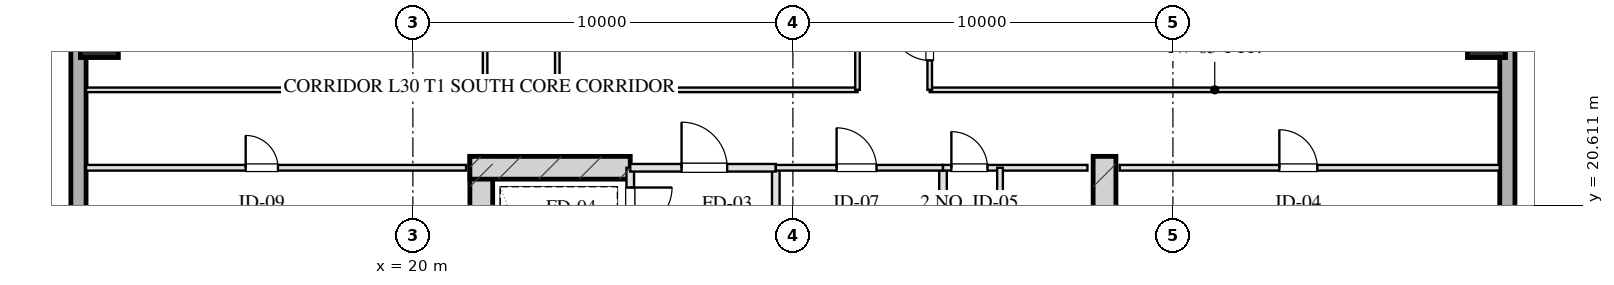
"""IFC4 building model, lengths in metres.
Left out: names, types, materials, properties, quantities, classifications, styles, units other than length and angle.
Written with IfcOpenShell. Run it as: python <this file> out.ifc"""

import sys

from ifc_helpers import new_model, si_unit, direction, frame, frame_2d, origin, origin_2d, place, context, subcontext, project, spatial, rectangle, hollow_rectangle, extrude, element, fill, save


model = new_model("IFC4")
c1 = context("Model", 3, precision=1e-05, world=origin(), true_north=direction((0.0, 1.0)))
c2 = subcontext(c1, "Body", "Model", "MODEL_VIEW")
j1 = project(units=[si_unit("LENGTHUNIT", "METRE"), si_unit("PLANEANGLEUNIT", "RADIAN")], contexts=[c1])
p1 = place(None, origin())
s1 = spatial("IfcSite", under=j1, at=p1, CompositionType="ELEMENT")
p2 = place(p1, origin())
s2 = spatial("IfcBuilding", under=s1, at=p2, CompositionType="ELEMENT")
p3 = place(p2, frame((0.0, 0.0, 117.3)))
s3 = spatial("IfcBuildingStorey", under=s2, at=p3, CompositionType="ELEMENT", Elevation=117.3)
for number, where, z_axis, x_axis in (
    (1, (21.8, 21.9, 0.0), (0.0, 0.0, 1.0), (0.0, -1.0, 0.0)),
    (2, (38.2, 21.9, 0.0), (0.0, 0.0, 1.0), (0.0, -1.0, 0.0)),
):
    element("IfcWall", number, at=place(p3, frame(where, z_axis=z_axis, x_axis=x_axis)), inside=s3, PredefinedType="SHEAR", context=c2, shape_type="SweptSolid", body=[
        extrude(rectangle(XDim=9.48, YDim=0.6, at=frame_2d((4.74, 0.0))), origin(), (0.0, 0.0, 1.0), 3.45),
    ])
p4 = place(p3, frame((21.5, 21.6, 0.0), z_axis=(0.0, 0.0, 1.0), x_axis=(1.0, 0.0, 0.0)))
e3 = element("IfcWall", 3, at=p4, inside=s3, PredefinedType="SHEAR", context=c2, shape_type="SweptSolid", body=[
    extrude(rectangle(XDim=4.22, YDim=0.6, at=frame_2d((2.11, 0.0))), origin(), (0.0, 0.0, 1.0), 3.45),
])
for number, where, z_axis, x_axis in (
    (4, (11.75, 25.0, 0.0), (0.0, 0.0, 1.0), (1.0, 0.0, 0.0)),
    (5, (48.25, 25.0, 0.0), (0.0, 0.0, 1.0), (1.0, 0.0, 0.0)),
):
    element("IfcColumn", number, at=place(p3, frame(where, z_axis=z_axis, x_axis=x_axis)), inside=s3, PredefinedType="COLUMN", context=c2, shape_type="SweptSolid", body=[
        extrude(hollow_rectangle(XDim=1.0, YDim=1.0, WallThickness=0.036, at=origin_2d()), origin(), (0.0, 0.0, 1.0), 3.451),
    ])
p5 = place(p3, frame((11.2, 9.0, 0.0), z_axis=(0.0, 0.0, 1.0), x_axis=(0.0, 1.0, 0.0)))
e6 = element("IfcWall", 6, at=p5, inside=s3, PredefinedType="SOLIDWALL", context=c2, shape_type="SweptSolid", body=[
    extrude(rectangle(XDim=50.0, YDim=0.4, at=frame_2d((25.0, 0.0))), origin(), (0.0, 0.0, 1.0), 2.61),
])
p6 = place(p5, frame((17.4, 0.0, 0.75)))
e7 = element("IfcOpeningElement", 7, at=p6, cuts=e6, PredefinedType="OPENING", context=c2, shape_type="SweptSolid", body=[
    extrude(rectangle(XDim=2.4, YDim=1.46, at=frame_2d((1.2, 0.73))), frame((0.0, 0.21, 0.0), z_axis=(0.0, -1.0, 0.0), x_axis=(1.0, 0.0, 0.0)), (0.0, 0.0, 1.0), 0.42),
])
p7 = place(p5, frame((30.2, 0.0, 0.75)))
e8 = element("IfcOpeningElement", 8, at=p7, cuts=e6, PredefinedType="OPENING", context=c2, shape_type="SweptSolid", body=[
    extrude(rectangle(XDim=2.4, YDim=1.46, at=frame_2d((1.2, 0.73))), frame((0.0, 0.21, 0.0), z_axis=(0.0, -1.0, 0.0), x_axis=(1.0, 0.0, 0.0)), (0.0, 0.0, 1.0), 0.42),
])
p8 = place(p3, frame((48.8, 59.0, 0.0), z_axis=(0.0, 0.0, 1.0), x_axis=(0.0, -1.0, 0.0)))
e9 = element("IfcWall", 9, at=p8, inside=s3, PredefinedType="SOLIDWALL", context=c2, shape_type="SweptSolid", body=[
    extrude(rectangle(XDim=50.0, YDim=0.4, at=frame_2d((25.0, 0.0))), origin(), (0.0, 0.0, 1.0), 2.61),
])
p9 = place(p8, frame((21.2, 0.0, 0.75)))
e10 = element("IfcOpeningElement", 10, at=p9, cuts=e9, PredefinedType="OPENING", context=c2, shape_type="SweptSolid", body=[
    extrude(rectangle(XDim=2.4, YDim=1.46, at=frame_2d((1.2, 0.73))), frame((0.0, 0.21, 0.0), z_axis=(0.0, -1.0, 0.0), x_axis=(1.0, 0.0, 0.0)), (0.0, 0.0, 1.0), 0.42),
])
p10 = place(p3, frame((25.72, 21.6, 0.0), z_axis=(0.0, 0.0, 1.0), x_axis=(0.0, -1.0, 0.0)))
e11 = element("IfcWall", 11, at=p10, inside=s3, PredefinedType="PARTITIONING", context=c2, shape_type="SweptSolid", body=[
    extrude(rectangle(XDim=1.9, YDim=0.2, at=frame_2d((0.95, 0.0))), origin(), (0.0, 0.0, 1.0), 3.175),
])
p11 = place(p10, frame((0.52, 0.0, 0.0)))
e12 = element("IfcOpeningElement", 12, at=p11, cuts=e11, PredefinedType="OPENING", context=c2, shape_type="SweptSolid", body=[
    extrude(rectangle(XDim=1.1, YDim=2.05, at=frame_2d((0.55, 1.025))), frame((0.0, 0.11, 0.0), z_axis=(0.0, -1.0, 0.0), x_axis=(1.0, 0.0, 0.0)), (0.0, 0.0, 1.0), 0.22),
])
p12 = place(p3, frame((29.55, 21.6, 0.0), z_axis=(0.0, 0.0, 1.0), x_axis=(0.0, -1.0, 0.0)))
e13 = element("IfcWall", 13, at=p12, inside=s3, PredefinedType="PARTITIONING", context=c2, shape_type="SweptSolid", body=[
    extrude(rectangle(XDim=8.43, YDim=0.2, at=frame_2d((4.215, 0.0))), origin(), (0.0, 0.0, 1.0), 3.175),
])
p13 = place(p3, frame((25.72, 21.6, 0.0), z_axis=(0.0, 0.0, 1.0), x_axis=(1.0, 0.0, 0.0)))
e14 = element("IfcWall", 14, at=p13, inside=s3, PredefinedType="PARTITIONING", context=c2, shape_type="SweptSolid", body=[
    extrude(rectangle(XDim=3.83, YDim=0.2, at=frame_2d((1.915, 0.0))), origin(), (0.0, 0.0, 1.0), 3.175),
])
p14 = place(p13, frame((1.35, 0.0, 0.0)))
e15 = element("IfcOpeningElement", 15, at=p14, cuts=e14, PredefinedType="OPENING", context=c2, shape_type="SweptSolid", body=[
    extrude(rectangle(XDim=1.2, YDim=2.05, at=frame_2d((0.6, 1.025))), frame((0.0, 0.11, 0.0), z_axis=(0.0, -1.0, 0.0), x_axis=(1.0, 0.0, 0.0)), (0.0, 0.0, 1.0), 0.22),
])
p15 = place(p3, frame((33.95, 21.6, 0.0), z_axis=(0.0, 0.0, 1.0), x_axis=(0.0, -1.0, 0.0)))
e16 = element("IfcWall", 16, at=p15, inside=s3, PredefinedType="PARTITIONING", context=c2, shape_type="SweptSolid", body=[
    extrude(rectangle(XDim=8.43, YDim=0.2, at=frame_2d((4.215, 0.0))), origin(), (0.0, 0.0, 1.0), 3.175),
])
p16 = place(p3, frame((29.55, 21.6, 0.0), z_axis=(0.0, 0.0, 1.0), x_axis=(1.0, 0.0, 0.0)))
e17 = element("IfcWall", 17, at=p16, inside=s3, PredefinedType="PARTITIONING", context=c2, shape_type="SweptSolid", body=[
    extrude(rectangle(XDim=4.4, YDim=0.15, at=frame_2d((2.2, 0.0))), origin(), (0.0, 0.0, 1.0), 3.175),
])
p17 = place(p16, frame((1.6, 0.0, 0.0)))
e18 = element("IfcOpeningElement", 18, at=p17, cuts=e17, PredefinedType="OPENING", context=c2, shape_type="SweptSolid", body=[
    extrude(rectangle(XDim=1.05, YDim=2.05, at=frame_2d((0.525, 1.025))), frame((0.0, 0.085, 0.0), z_axis=(0.0, -1.0, 0.0), x_axis=(1.0, 0.0, 0.0)), (0.0, 0.0, 1.0), 0.17),
])
p18 = place(p3, frame((33.95, 21.6, 0.0), z_axis=(0.0, 0.0, 1.0), x_axis=(1.0, 0.0, 0.0)))
e19 = element("IfcWall", 19, at=p18, inside=s3, PredefinedType="PARTITIONING", context=c2, shape_type="SweptSolid", body=[
    extrude(rectangle(XDim=3.8, YDim=0.15, at=frame_2d((1.9, 0.0))), origin(), (0.0, 0.0, 1.0), 3.175),
])
p19 = place(p18, frame((0.22, 0.0, 0.0)))
e20 = element("IfcOpeningElement", 20, at=p19, cuts=e19, PredefinedType="OPENING", context=c2, shape_type="SweptSolid", body=[
    extrude(rectangle(XDim=0.95, YDim=2.05, at=frame_2d((0.475, 1.025))), frame((0.0, 0.085, 0.0), z_axis=(0.0, -1.0, 0.0), x_axis=(1.0, 0.0, 0.0)), (0.0, 0.0, 1.0), 0.17),
])
p20 = place(p3, frame((35.45, 21.6, 0.0), z_axis=(0.0, 0.0, 1.0), x_axis=(0.0, -1.0, 0.0)))
e21 = element("IfcWall", 21, at=p20, inside=s3, PredefinedType="PARTITIONING", context=c2, shape_type="SweptSolid", body=[
    extrude(rectangle(XDim=8.43, YDim=0.15, at=frame_2d((4.215, 0.0))), origin(), (0.0, 0.0, 1.0), 2.765),
])
p21 = place(p20, frame((2.55, 0.0, 0.0)))
e22 = element("IfcOpeningElement", 22, at=p21, cuts=e21, PredefinedType="OPENING", context=c2, shape_type="SweptSolid", body=[
    extrude(rectangle(XDim=0.95, YDim=2.05, at=frame_2d((0.475, 1.025))), frame((0.0, 0.085, 0.0), z_axis=(0.0, -1.0, 0.0), x_axis=(1.0, 0.0, 0.0)), (0.0, 0.0, 1.0), 0.17),
])
p22 = place(p20, frame((5.8, 0.0, 0.0)))
e23 = element("IfcOpeningElement", 23, at=p22, cuts=e21, PredefinedType="OPENING", context=c2, shape_type="SweptSolid", body=[
    extrude(rectangle(XDim=0.9, YDim=2.05, at=frame_2d((0.45, 1.025))), frame((0.0, 0.085, 0.0), z_axis=(0.0, -1.0, 0.0), x_axis=(1.0, 0.0, 0.0)), (0.0, 0.0, 1.0), 0.17),
])
p23 = place(p3, frame((11.4, 21.6, 0.0), z_axis=(0.0, 0.0, 1.0), x_axis=(1.0, 0.0, 0.0)))
e24 = element("IfcWall", 24, at=p23, inside=s3, PredefinedType="PARTITIONING", context=c2, shape_type="SweptSolid", body=[
    extrude(rectangle(XDim=10.0, YDim=0.15, at=frame_2d((5.0, 0.0))), origin(), (0.0, 0.0, 1.0), 3.175),
])
p24 = place(p23, frame((4.2, 0.0, 0.0)))
e25 = element("IfcOpeningElement", 25, at=p24, cuts=e24, PredefinedType="OPENING", context=c2, shape_type="SweptSolid", body=[
    extrude(rectangle(XDim=0.85, YDim=2.05, at=frame_2d((0.425, 1.025))), frame((0.0, 0.085, 0.0), z_axis=(0.0, -1.0, 0.0), x_axis=(1.0, 0.0, 0.0)), (0.0, 0.0, 1.0), 0.17),
])
p25 = place(p3, frame((38.6, 21.6, 0.0), z_axis=(0.0, 0.0, 1.0), x_axis=(1.0, 0.0, 0.0)))
e26 = element("IfcWall", 26, at=p25, inside=s3, PredefinedType="PARTITIONING", context=c2, shape_type="SweptSolid", body=[
    extrude(rectangle(XDim=10.0, YDim=0.15, at=frame_2d((5.0, 0.0))), origin(), (0.0, 0.0, 1.0), 3.175),
])
p26 = place(p25, frame((4.2, 0.0, 0.0)))
e27 = element("IfcOpeningElement", 27, at=p26, cuts=e26, PredefinedType="OPENING", context=c2, shape_type="SweptSolid", body=[
    extrude(rectangle(XDim=1.0, YDim=2.05, at=frame_2d((0.5, 1.025))), frame((0.0, 0.085, 0.0), z_axis=(0.0, -1.0, 0.0), x_axis=(1.0, 0.0, 0.0)), (0.0, 0.0, 1.0), 0.17),
])
p27 = place(p3, frame((11.4, 23.65, 0.0), z_axis=(0.0, 0.0, 1.0), x_axis=(1.0, 0.0, 0.0)))
e28 = element("IfcWall", 28, at=p27, inside=s3, PredefinedType="PARTITIONING", context=c2, shape_type="SweptSolid", body=[
    extrude(rectangle(XDim=10.5, YDim=0.12, at=frame_2d((5.25, 0.0))), origin(), (0.0, 0.0, 1.0), 3.175),
])
p28 = place(p3, frame((23.8, 23.65, 0.0), z_axis=(0.0, 0.0, 1.0), x_axis=(1.0, 0.0, 0.0)))
e29 = element("IfcWall", 29, at=p28, inside=s3, PredefinedType="PARTITIONING", context=c2, shape_type="SweptSolid", body=[
    extrude(rectangle(XDim=7.9, YDim=0.12, at=frame_2d((3.95, 0.0))), origin(), (0.0, 0.0, 1.0), 3.175),
])
p29 = place(p3, frame((33.6, 23.65, 0.0), z_axis=(0.0, 0.0, 1.0), x_axis=(1.0, 0.0, 0.0)))
e30 = element("IfcWall", 30, at=p29, inside=s3, PredefinedType="PARTITIONING", context=c2, shape_type="SweptSolid", body=[
    extrude(rectangle(XDim=15.0, YDim=0.12, at=frame_2d((7.5, 0.0))), origin(), (0.0, 0.0, 1.0), 3.175),
])
p30 = place(p3, frame((21.9, 23.65, 0.0), z_axis=(0.0, 0.0, 1.0), x_axis=(0.0, 1.0, 0.0)))
e31 = element("IfcWall", 31, at=p30, inside=s3, PredefinedType="PARTITIONING", context=c2, shape_type="SweptSolid", body=[
    extrude(rectangle(XDim=20.7, YDim=0.12, at=frame_2d((10.35, 0.0))), origin(), (0.0, 0.0, 1.0), 3.175),
])
p31 = place(p30, frame((2.675, 0.0, 0.0)))
e32 = element("IfcOpeningElement", 32, at=p31, cuts=e31, PredefinedType="OPENING", context=c2, shape_type="SweptSolid", body=[
    extrude(rectangle(XDim=1.05, YDim=2.05, at=frame_2d((0.525, 1.025))), frame((0.0, 0.07, 0.0), z_axis=(0.0, -1.0, 0.0), x_axis=(1.0, 0.0, 0.0)), (0.0, 0.0, 1.0), 0.14),
])
p32 = place(p30, frame((9.85, 0.0, 0.0)))
e33 = element("IfcOpeningElement", 33, at=p32, cuts=e31, PredefinedType="OPENING", context=c2, shape_type="SweptSolid", body=[
    extrude(rectangle(XDim=1.0, YDim=2.05, at=frame_2d((0.5, 1.025))), frame((0.0, 0.07, 0.0), z_axis=(0.0, -1.0, 0.0), x_axis=(1.0, 0.0, 0.0)), (0.0, 0.0, 1.0), 0.14),
])
p33 = place(p30, frame((17.025, 0.0, 0.0)))
e34 = element("IfcOpeningElement", 34, at=p33, cuts=e31, PredefinedType="OPENING", context=c2, shape_type="SweptSolid", body=[
    extrude(rectangle(XDim=1.0, YDim=2.05, at=frame_2d((0.5, 1.025))), frame((0.0, 0.07, 0.0), z_axis=(0.0, -1.0, 0.0), x_axis=(1.0, 0.0, 0.0)), (0.0, 0.0, 1.0), 0.14),
])
p34 = place(p3, frame((23.8, 23.65, 0.0), z_axis=(0.0, 0.0, 1.0), x_axis=(0.0, 1.0, 0.0)))
e35 = element("IfcWall", 35, at=p34, inside=s3, PredefinedType="PARTITIONING", context=c2, shape_type="SweptSolid", body=[
    extrude(rectangle(XDim=20.7, YDim=0.12, at=frame_2d((10.35, 0.0))), origin(), (0.0, 0.0, 1.0), 3.175),
])
p35 = place(p34, frame((2.857, 0.0, 0.0)))
e36 = element("IfcOpeningElement", 36, at=p35, cuts=e35, PredefinedType="OPENING", context=c2, shape_type="SweptSolid", body=[
    extrude(rectangle(XDim=1.1, YDim=2.05, at=frame_2d((0.55, 1.025))), frame((0.0, 0.07, 0.0), z_axis=(0.0, -1.0, 0.0), x_axis=(1.0, 0.0, 0.0)), (0.0, 0.0, 1.0), 0.14),
])
p36 = place(p34, frame((17.189, 0.0, 0.0)))
e37 = element("IfcOpeningElement", 37, at=p36, cuts=e35, PredefinedType="OPENING", context=c2, shape_type="SweptSolid", body=[
    extrude(rectangle(XDim=1.1, YDim=2.05, at=frame_2d((0.55, 1.025))), frame((0.0, 0.07, 0.0), z_axis=(0.0, -1.0, 0.0), x_axis=(1.0, 0.0, 0.0)), (0.0, 0.0, 1.0), 0.14),
])
p37 = place(p3, frame((31.7, 23.65, 0.0), z_axis=(0.0, 0.0, 1.0), x_axis=(0.0, 1.0, 0.0)))
e38 = element("IfcWall", 38, at=p37, inside=s3, PredefinedType="PARTITIONING", context=c2, shape_type="SweptSolid", body=[
    extrude(rectangle(XDim=20.7, YDim=0.12, at=frame_2d((10.35, 0.0))), origin(), (0.0, 0.0, 1.0), 3.175),
])
p38 = place(p37, frame((9.696, 0.0, 0.0)))
e39 = element("IfcOpeningElement", 39, at=p38, cuts=e38, PredefinedType="OPENING", context=c2, shape_type="SweptSolid", body=[
    extrude(rectangle(XDim=1.1, YDim=2.05, at=frame_2d((0.55, 1.025))), frame((0.0, 0.07, 0.0), z_axis=(0.0, -1.0, 0.0), x_axis=(1.0, 0.0, 0.0)), (0.0, 0.0, 1.0), 0.14),
])
p39 = place(p3, frame((33.6, 23.65, 0.0), z_axis=(0.0, 0.0, 1.0), x_axis=(0.0, 1.0, 0.0)))
e40 = element("IfcWall", 40, at=p39, inside=s3, PredefinedType="PARTITIONING", context=c2, shape_type="SweptSolid", body=[
    extrude(rectangle(XDim=20.7, YDim=0.12, at=frame_2d((10.35, 0.0))), origin(), (0.0, 0.0, 1.0), 3.175),
])
p40 = place(p39, frame((0.775, 0.0, 0.0)))
e41 = element("IfcOpeningElement", 41, at=p40, cuts=e40, PredefinedType="OPENING", context=c2, shape_type="SweptSolid", body=[
    extrude(rectangle(XDim=1.0, YDim=2.05, at=frame_2d((0.5, 1.025))), frame((0.0, 0.07, 0.0), z_axis=(0.0, -1.0, 0.0), x_axis=(1.0, 0.0, 0.0)), (0.0, 0.0, 1.0), 0.14),
])
p41 = place(p39, frame((3.95, 0.0, 0.0)))
e42 = element("IfcOpeningElement", 42, at=p41, cuts=e40, PredefinedType="OPENING", context=c2, shape_type="SweptSolid", body=[
    extrude(rectangle(XDim=1.05, YDim=2.05, at=frame_2d((0.525, 1.025))), frame((0.0, 0.07, 0.0), z_axis=(0.0, -1.0, 0.0), x_axis=(1.0, 0.0, 0.0)), (0.0, 0.0, 1.0), 0.14),
])
p42 = place(p39, frame((8.19, 0.0, 0.0)))
e43 = element("IfcOpeningElement", 43, at=p42, cuts=e40, PredefinedType="OPENING", context=c2, shape_type="SweptSolid", body=[
    extrude(rectangle(XDim=1.0, YDim=2.05, at=frame_2d((0.5, 1.025))), frame((0.0, 0.07, 0.0), z_axis=(0.0, -1.0, 0.0), x_axis=(1.0, 0.0, 0.0)), (0.0, 0.0, 1.0), 0.14),
])
p43 = place(p39, frame((12.257, 0.0, 0.0)))
e44 = element("IfcOpeningElement", 44, at=p43, cuts=e40, PredefinedType="OPENING", context=c2, shape_type="SweptSolid", body=[
    extrude(rectangle(XDim=1.0, YDim=2.05, at=frame_2d((0.5, 1.025))), frame((0.0, 0.07, 0.0), z_axis=(0.0, -1.0, 0.0), x_axis=(1.0, 0.0, 0.0)), (0.0, 0.0, 1.0), 0.14),
])
p44 = place(p39, frame((15.816, 0.0, 0.0)))
e45 = element("IfcOpeningElement", 45, at=p44, cuts=e40, PredefinedType="OPENING", context=c2, shape_type="SweptSolid", body=[
    extrude(rectangle(XDim=1.0, YDim=2.05, at=frame_2d((0.5, 1.025))), frame((0.0, 0.07, 0.0), z_axis=(0.0, -1.0, 0.0), x_axis=(1.0, 0.0, 0.0)), (0.0, 0.0, 1.0), 0.14),
])
p45 = place(p39, frame((18.925, 0.0, 0.0)))
e46 = element("IfcOpeningElement", 46, at=p45, cuts=e40, PredefinedType="OPENING", context=c2, shape_type="SweptSolid", body=[
    extrude(rectangle(XDim=1.0, YDim=2.05, at=frame_2d((0.5, 1.025))), frame((0.0, 0.07, 0.0), z_axis=(0.0, -1.0, 0.0), x_axis=(1.0, 0.0, 0.0)), (0.0, 0.0, 1.0), 0.14),
])
p46 = place(p11, origin())
e47 = element("IfcDoor", 47, at=p46, inside=s3, OperationType="SINGLE_SWING_LEFT", PredefinedType="DOOR", context=c2, shape_type="SweptSolid", body=[
    extrude(rectangle(XDim=1.1, YDim=2.05, at=frame_2d((0.55, 1.025))), frame((0.0, 0.025, 0.0), z_axis=(0.0, -1.0, 0.0), x_axis=(1.0, 0.0, 0.0)), (0.0, 0.0, 1.0), 0.05),
])
fill(e12, e47)
p47 = place(p14, origin())
e48 = element("IfcDoor", 48, at=p47, inside=s3, OperationType="SINGLE_SWING_LEFT", PredefinedType="DOOR", context=c2, shape_type="SweptSolid", body=[
    extrude(rectangle(XDim=1.2, YDim=2.05, at=frame_2d((0.6, 1.025))), frame((0.0, 0.025, 0.0), z_axis=(0.0, -1.0, 0.0), x_axis=(1.0, 0.0, 0.0)), (0.0, 0.0, 1.0), 0.05),
])
fill(e15, e48)
p48 = place(p17, origin())
e49 = element("IfcDoor", 49, at=p48, inside=s3, OperationType="SINGLE_SWING_LEFT", PredefinedType="DOOR", context=c2, shape_type="SweptSolid", body=[
    extrude(rectangle(XDim=1.05, YDim=2.05, at=frame_2d((0.525, 1.025))), frame((0.0, 0.025, 0.0), z_axis=(0.0, -1.0, 0.0), x_axis=(1.0, 0.0, 0.0)), (0.0, 0.0, 1.0), 0.05),
])
fill(e18, e49)
p49 = place(p19, origin())
e50 = element("IfcDoor", 50, at=p49, inside=s3, OperationType="SINGLE_SWING_LEFT", PredefinedType="DOOR", context=c2, shape_type="SweptSolid", body=[
    extrude(rectangle(XDim=0.95, YDim=2.05, at=frame_2d((0.475, 1.025))), frame((0.0, 0.025, 0.0), z_axis=(0.0, -1.0, 0.0), x_axis=(1.0, 0.0, 0.0)), (0.0, 0.0, 1.0), 0.05),
])
fill(e20, e50)
p50 = place(p24, origin())
e51 = element("IfcDoor", 51, at=p50, inside=s3, OperationType="SINGLE_SWING_LEFT", PredefinedType="DOOR", context=c2, shape_type="SweptSolid", body=[
    extrude(rectangle(XDim=0.85, YDim=2.05, at=frame_2d((0.425, 1.025))), frame((0.0, 0.025, 0.0), z_axis=(0.0, -1.0, 0.0), x_axis=(1.0, 0.0, 0.0)), (0.0, 0.0, 1.0), 0.05),
])
fill(e25, e51)
p51 = place(p26, origin())
e52 = element("IfcDoor", 52, at=p51, inside=s3, OperationType="SINGLE_SWING_LEFT", PredefinedType="DOOR", context=c2, shape_type="SweptSolid", body=[
    extrude(rectangle(XDim=1.0, YDim=2.05, at=frame_2d((0.5, 1.025))), frame((0.0, 0.025, 0.0), z_axis=(0.0, -1.0, 0.0), x_axis=(1.0, 0.0, 0.0)), (0.0, 0.0, 1.0), 0.05),
])
fill(e27, e52)
p52 = place(p40, origin())
e53 = element("IfcDoor", 53, at=p52, inside=s3, OperationType="SINGLE_SWING_RIGHT", PredefinedType="DOOR", context=c2, shape_type="SweptSolid", body=[
    extrude(rectangle(XDim=1.0, YDim=2.05, at=frame_2d((0.5, 1.025))), frame((0.0, 0.025, 0.0), z_axis=(0.0, -1.0, 0.0), x_axis=(1.0, 0.0, 0.0)), (0.0, 0.0, 1.0), 0.05),
])
fill(e41, e53)
save(model, sys.argv[1])
